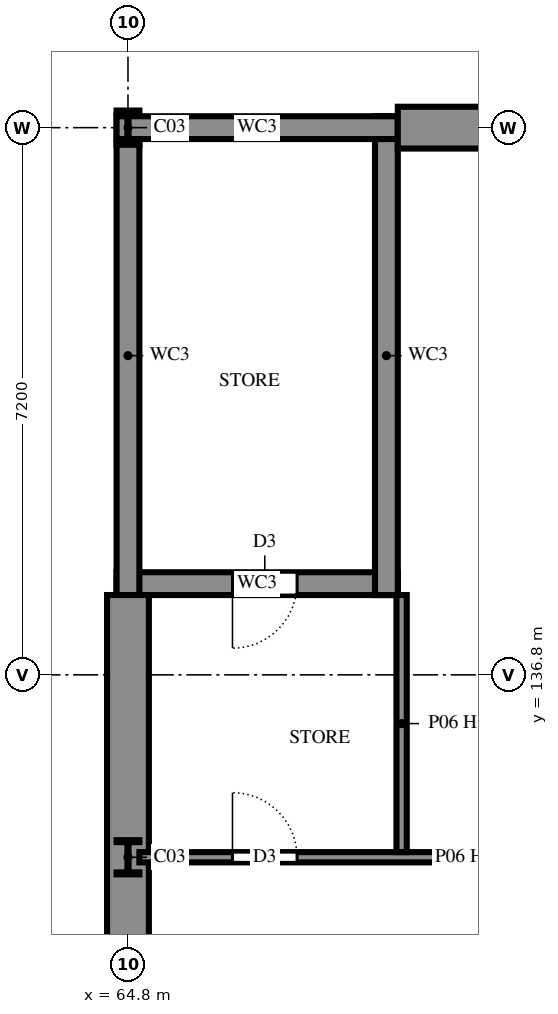
"""IFC4 building model, lengths in metres.
Left out: names, types, materials, properties, quantities, classifications, styles, units other than length and angle.
Written with IfcOpenShell. Run it as: python <this file> out.ifc"""

import sys

from ifc_helpers import new_model, si_unit, direction, frame, frame_2d, origin, origin_2d, place, context, subcontext, project, spatial, rectangle, i_section, extrude, element, fill, save


model = new_model("IFC4")
c1 = context("Model", 3, precision=1e-05, world=origin(), true_north=direction((0.0, 1.0)))
c2 = subcontext(c1, "Body", "Model", "MODEL_VIEW")
j1 = project(units=[si_unit("LENGTHUNIT", "METRE"), si_unit("PLANEANGLEUNIT", "RADIAN")], contexts=[c1])
p1 = place(None, origin())
s1 = spatial("IfcSite", under=j1, at=p1, CompositionType="ELEMENT")
p2 = place(p1, origin())
s2 = spatial("IfcBuilding", under=s1, at=p2, CompositionType="ELEMENT")
p3 = place(p2, frame((0.0, 0.0, 3.6)))
s3 = spatial("IfcBuildingStorey", under=s2, at=p3, CompositionType="ELEMENT", Elevation=3.6)
for number, where, z_axis, x_axis in (
    (1, (64.8, 134.4, 0.0), (0.0, 0.0, 1.0), (1.0, 0.0, 0.0)),
    (2, (64.8, 144.0, 0.0), (0.0, 0.0, 1.0), (1.0, 0.0, 0.0)),
):
    element("IfcColumn", number, at=place(p3, frame(where, z_axis=z_axis, x_axis=x_axis)), inside=s3, PredefinedType="COLUMN", context=c2, shape_type="SweptSolid", body=[
        extrude(i_section(OverallWidth=0.3, OverallDepth=0.45, WebThickness=0.014, FlangeThickness=0.026, FilletRadius=0.027, at=origin_2d()), origin(), (0.0, 0.0, 1.0), 3.6),
    ])
p4 = place(p3, frame((64.65, 138.0, 0.0), z_axis=(0.0, 0.0, 1.0), x_axis=(1.0, 0.0, 0.0)))
e3 = element("IfcWall", 3, at=p4, inside=s3, PredefinedType="SHEAR", context=c2, shape_type="SweptSolid", body=[
    extrude(rectangle(XDim=3.7, YDim=0.3, at=frame_2d((1.85, 0.0))), origin(), (0.0, 0.0, 1.0), 3.6),
])
p5 = place(p4, frame((1.525, 0.0, 0.0)))
e4 = element("IfcOpeningElement", 4, at=p5, cuts=e3, PredefinedType="OPENING", context=c2, shape_type="SweptSolid", body=[
    extrude(rectangle(XDim=0.85, YDim=2.1, at=frame_2d((0.425, 1.05))), frame((0.0, 0.16, 0.0), z_axis=(0.0, -1.0, 0.0), x_axis=(1.0, 0.0, 0.0)), (0.0, 0.0, 1.0), 0.32),
])
for number, where, z_axis, x_axis in (
    (5, (68.2, 137.85, 0.0), (0.0, 0.0, 1.0), (0.0, 1.0, 0.0)),
    (6, (64.8, 144.15, 0.0), (0.0, 0.0, 1.0), (0.0, -1.0, 0.0)),
):
    element("IfcWall", number, at=place(p3, frame(where, z_axis=z_axis, x_axis=x_axis)), inside=s3, PredefinedType="SHEAR", context=c2, shape_type="SweptSolid", body=[
        extrude(rectangle(XDim=6.3, YDim=0.3, at=frame_2d((3.15, 0.0))), origin(), (0.0, 0.0, 1.0), 3.6),
    ])
p6 = place(p3, frame((68.35, 144.0, 0.0), z_axis=(0.0, 0.0, 1.0), x_axis=(-1.0, 0.0, 0.0)))
e7 = element("IfcWall", 7, at=p6, inside=s3, PredefinedType="SHEAR", context=c2, shape_type="SweptSolid", body=[
    extrude(rectangle(XDim=3.7, YDim=0.3, at=frame_2d((1.85, 0.0))), origin(), (0.0, 0.0, 1.0), 3.6),
])
p7 = place(p3, frame((68.35, 144.0, 0.0), z_axis=(0.0, 0.0, 1.0), x_axis=(1.0, 0.0, 0.0)))
e8 = element("IfcWall", 8, at=p7, inside=s3, PredefinedType="SOLIDWALL", context=c2, shape_type="SweptSolid", body=[
    extrude(rectangle(XDim=25.05, YDim=0.55, at=frame_2d((12.525, 0.0))), origin(), (0.0, 0.0, 1.0), 3.6),
])
p8 = place(p3, frame((64.8, 122.4, 0.0), z_axis=(0.0, 0.0, 1.0), x_axis=(0.0, 1.0, 0.0)))
e9 = element("IfcWall", 9, at=p8, inside=s3, PredefinedType="SOLIDWALL", context=c2, shape_type="SweptSolid", body=[
    extrude(rectangle(XDim=15.45, YDim=0.55, at=frame_2d((7.725, 0.0))), origin(), (0.0, 0.0, 1.0), 3.6),
])
p9 = place(p3, frame((64.95, 134.4, 0.0), z_axis=(0.0, 0.0, 1.0), x_axis=(1.0, 0.0, 0.0)))
e10 = element("IfcWall", 10, at=p9, inside=s3, PredefinedType="PARTITIONING", context=c2, shape_type="SweptSolid", body=[
    extrude(rectangle(XDim=28.45, YDim=0.135, at=frame_2d((14.225, 0.0))), origin(), (0.0, 0.0, 1.0), 3.12),
])
p10 = place(p9, frame((1.225, 0.0, 0.0)))
e11 = element("IfcOpeningElement", 11, at=p10, cuts=e10, PredefinedType="OPENING", context=c2, shape_type="SweptSolid", body=[
    extrude(rectangle(XDim=0.85, YDim=2.1, at=frame_2d((0.425, 1.05))), frame((0.0, 0.077, 0.0), z_axis=(0.0, -1.0, 0.0), x_axis=(1.0, 0.0, 0.0)), (0.0, 0.0, 1.0), 0.155),
])
p11 = place(p9, frame((9.75, 0.0, 0.0)))
e12 = element("IfcOpeningElement", 12, at=p11, cuts=e10, PredefinedType="OPENING", context=c2, shape_type="SweptSolid", body=[
    extrude(rectangle(XDim=1.8, YDim=2.1, at=frame_2d((0.9, 1.05))), frame((0.0, 0.077, 0.0), z_axis=(0.0, -1.0, 0.0), x_axis=(1.0, 0.0, 0.0)), (0.0, 0.0, 1.0), 0.155),
])
p12 = place(p9, frame((16.95, 0.0, 0.0)))
e13 = element("IfcOpeningElement", 13, at=p12, cuts=e10, PredefinedType="OPENING", context=c2, shape_type="SweptSolid", body=[
    extrude(rectangle(XDim=1.8, YDim=2.1, at=frame_2d((0.9, 1.05))), frame((0.0, 0.077, 0.0), z_axis=(0.0, -1.0, 0.0), x_axis=(1.0, 0.0, 0.0)), (0.0, 0.0, 1.0), 0.155),
])
p13 = place(p9, frame((24.15, 0.0, 0.0)))
e14 = element("IfcOpeningElement", 14, at=p13, cuts=e10, PredefinedType="OPENING", context=c2, shape_type="SweptSolid", body=[
    extrude(rectangle(XDim=1.8, YDim=2.1, at=frame_2d((0.9, 1.05))), frame((0.0, 0.077, 0.0), z_axis=(0.0, -1.0, 0.0), x_axis=(1.0, 0.0, 0.0)), (0.0, 0.0, 1.0), 0.155),
])
p14 = place(p3, frame((68.4, 134.468, 0.0), z_axis=(0.0, 0.0, 1.0), x_axis=(0.0, 1.0, 0.0)))
e15 = element("IfcWall", 15, at=p14, inside=s3, PredefinedType="PARTITIONING", context=c2, shape_type="SweptSolid", body=[
    extrude(rectangle(XDim=3.383, YDim=0.135, at=frame_2d((1.691, 0.0))), origin(), (0.0, 0.0, 1.0), 3.02),
])
p15 = place(p10, origin())
e16 = element("IfcDoor", 16, at=p15, inside=s3, OperationType="SINGLE_SWING_RIGHT", PredefinedType="DOOR", context=c2, shape_type="SweptSolid", body=[
    extrude(rectangle(XDim=0.85, YDim=2.1, at=frame_2d((0.425, 1.05))), frame((0.0, 0.025, 0.0), z_axis=(0.0, -1.0, 0.0), x_axis=(1.0, 0.0, 0.0)), (0.0, 0.0, 1.0), 0.05),
])
fill(e11, e16)
p16 = place(p5, frame((0.85, 0.0, 0.0), z_axis=(0.0, 0.0, 1.0), x_axis=(-1.0, 0.0, 0.0)))
e17 = element("IfcDoor", 17, at=p16, inside=s3, OperationType="SINGLE_SWING_LEFT", PredefinedType="DOOR", context=c2, shape_type="SweptSolid", body=[
    extrude(rectangle(XDim=0.85, YDim=2.1, at=frame_2d((0.425, 1.05))), frame((0.0, 0.025, 0.0), z_axis=(0.0, -1.0, 0.0), x_axis=(1.0, 0.0, 0.0)), (0.0, 0.0, 1.0), 0.05),
])
fill(e4, e17)
save(model, sys.argv[1])
